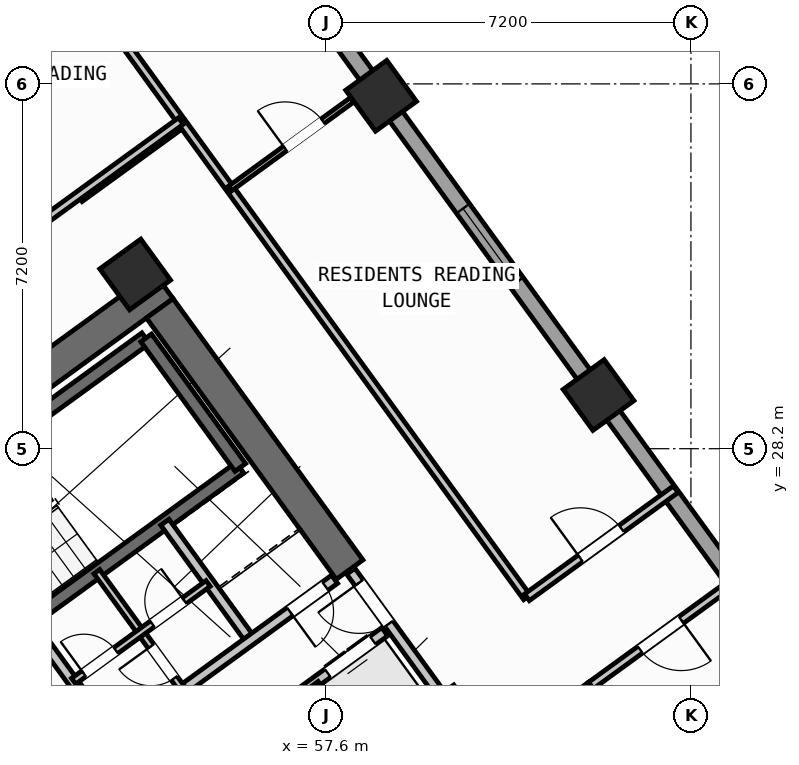
"""IFC4 building model, lengths in metres.
Left out: names, types, materials, properties, quantities, classifications, styles, units other than length and angle.
Written with IfcOpenShell. Run it as: python <this file> out.ifc"""

import sys

from ifc_helpers import new_model, si_unit, direction, frame, frame_2d, origin, origin_2d, place, context, subcontext, project, spatial, rectangle, hollow_rectangle, extrude, source, transform, mapped, element, fill, save


model = new_model("IFC4")
c1 = context("Model", 3, precision=1e-05, world=origin(), true_north=direction((0.0, 1.0)))
c2 = subcontext(c1, "Body", "Model", "MODEL_VIEW")
j1 = project(units=[si_unit("LENGTHUNIT", "METRE"), si_unit("PLANEANGLEUNIT", "RADIAN")], contexts=[c1])
p1 = place(None, origin())
s1 = spatial("IfcSite", under=j1, at=p1, CompositionType="ELEMENT")
p2 = place(p1, origin())
s2 = spatial("IfcBuilding", under=s1, at=p2, CompositionType="ELEMENT")
p3 = place(p2, frame((0.0, 0.0, 81.0)))
s3 = spatial("IfcBuildingStorey", under=s2, at=p3, CompositionType="ELEMENT", Elevation=81.0)
p4 = place(p3, frame((44.325, 24.113, 0.0), z_axis=(0.0, 0.0, 1.0), x_axis=(0.809012664862, 0.58779121131, 0.0)))
e1 = element("IfcWall", 1, at=p4, inside=s3, PredefinedType="SHEAR", context=c2, shape_type="SweptSolid", body=[
    extrude(rectangle(XDim=12.44, YDim=0.65, at=frame_2d((6.22, 0.0))), origin(), (0.0, 0.0, 1.0), 3.32),
])
p5 = place(p3, frame((58.064, 25.813, 0.0), z_axis=(0.0, 0.0, 1.0), x_axis=(-0.58777996584, 0.809020835181, 0.0)))
e2 = element("IfcWall", 2, at=p5, inside=s3, PredefinedType="SHEAR", context=c2, shape_type="SweptSolid", body=[
    extrude(rectangle(XDim=6.375, YDim=0.65, at=frame_2d((3.188, 0.0))), origin(), (0.0, 0.0, 1.0), 3.32),
])
m1 = source(origin(), c2, "Body", "SweptSolid", [
    extrude(hollow_rectangle(XDim=1.0, YDim=1.0, WallThickness=0.04, at=origin_2d()), origin(), (0.0, 0.0, 1.0), 3.6),
])
for number, where, z_axis, x_axis in (
    (3, (53.832, 31.638, 0.0), (0.0, 0.0, 1.0), (0.809, 0.588, 0.0)),
    (4, (62.977, 29.259, 0.0), (0.0, 0.0, 1.0), (0.809, 0.588, 0.0)),
    (5, (58.686, 35.165, 0.0), (0.0, 0.0, 1.0), (0.809, 0.588, 0.0)),
):
    element("IfcColumn", number, at=place(p3, frame(where, z_axis=z_axis, x_axis=x_axis)), inside=s3, PredefinedType="COLUMN", context=c2, shape_type="MappedRepresentation", body=[
        mapped(m1, transform((0.0, 0.0, 0.0), scale=1.0)),
    ])
p6 = place(p3, frame((42.207, 31.597, 0.0), z_axis=(0.0, 0.0, 1.0), x_axis=(0.809020333377, 0.587780656523, 0.0)))
e6 = element("IfcWall", 6, at=p6, inside=s3, PredefinedType="STANDARD", context=c2, shape_type="SweptSolid", body=[
    extrude(rectangle(XDim=15.223, YDim=0.32, at=frame_2d((7.611, 0.0))), origin(), (0.0, 0.0, 1.0), 3.32),
])
p7 = place(p6, frame((12.82, 0.0, 0.0)))
e7 = element("IfcOpeningElement", 7, at=p7, cuts=e6, PredefinedType="OPENING", context=c2, shape_type="SweptSolid", body=[
    extrude(rectangle(XDim=1.05, YDim=2.15, at=frame_2d((0.525, 1.075))), frame((0.0, 0.17, 0.0), z_axis=(0.0, -1.0, 0.0), x_axis=(1.0, 0.0, 0.0)), (0.0, 0.0, 1.0), 0.34),
])
p8 = place(p6, frame((0.775, 0.0, 0.85)))
e8 = element("IfcOpeningElement", 8, at=p8, cuts=e6, PredefinedType="OPENING", context=c2, shape_type="SweptSolid", body=[
    extrude(rectangle(XDim=1.8, YDim=1.5, at=frame_2d((0.9, 0.75))), frame((0.0, 0.17, 0.0), z_axis=(0.0, -1.0, 0.0), x_axis=(1.0, 0.0, 0.0)), (0.0, 0.0, 1.0), 0.34),
])
p9 = place(p6, frame((5.544, 0.0, 0.85)))
e9 = element("IfcOpeningElement", 9, at=p9, cuts=e6, PredefinedType="OPENING", context=c2, shape_type="SweptSolid", body=[
    extrude(rectangle(XDim=1.8, YDim=1.5, at=frame_2d((0.9, 0.75))), frame((0.0, 0.17, 0.0), z_axis=(0.0, -1.0, 0.0), x_axis=(1.0, 0.0, 0.0)), (0.0, 0.0, 1.0), 0.34),
])
p10 = place(p6, frame((10.219, 0.0, 1.0)))
e10 = element("IfcOpeningElement", 10, at=p10, cuts=e6, PredefinedType="OPENING", context=c2, shape_type="SweptSolid", body=[
    extrude(rectangle(XDim=0.9, YDim=1.25, at=frame_2d((0.45, 0.625))), frame((0.0, 0.17, 0.0), z_axis=(0.0, -1.0, 0.0), x_axis=(1.0, 0.0, 0.0)), (0.0, 0.0, 1.0), 0.34),
])
p11 = place(p3, frame((54.81, 40.5, 0.0), z_axis=(0.0, 0.0, 1.0), x_axis=(0.587783625747, -0.809018176127, 0.0)))
e11 = element("IfcWall", 11, at=p11, inside=s3, PredefinedType="STANDARD", context=c2, shape_type="SweptSolid", body=[
    extrude(rectangle(XDim=21.587, YDim=0.32, at=frame_2d((10.794, 0.0))), origin(), (0.0, 0.0, 1.0), 2.745),
])
p12 = place(p11, frame((2.356, 0.0, 0.8)))
e12 = element("IfcOpeningElement", 12, at=p12, cuts=e11, PredefinedType="OPENING", context=c2, shape_type="SweptSolid", body=[
    extrude(rectangle(XDim=2.1, YDim=1.55, at=frame_2d((1.05, 0.775))), frame((0.0, 0.17, 0.0), z_axis=(0.0, -1.0, 0.0), x_axis=(1.0, 0.0, 0.0)), (0.0, 0.0, 1.0), 0.34),
])
p13 = place(p11, frame((9.344, 0.0, 0.85)))
e13 = element("IfcOpeningElement", 13, at=p13, cuts=e11, PredefinedType="OPENING", context=c2, shape_type="SweptSolid", body=[
    extrude(rectangle(XDim=1.8, YDim=1.5, at=frame_2d((0.9, 0.75))), frame((0.0, 0.17, 0.0), z_axis=(0.0, -1.0, 0.0), x_axis=(1.0, 0.0, 0.0)), (0.0, 0.0, 1.0), 0.34),
])
p14 = place(p11, frame((19.209, 0.0, 1.0)))
e14 = element("IfcOpeningElement", 14, at=p14, cuts=e11, PredefinedType="OPENING", context=c2, shape_type="SweptSolid", body=[
    extrude(rectangle(XDim=0.9, YDim=1.25, at=frame_2d((0.45, 0.625))), frame((0.0, 0.17, 0.0), z_axis=(0.0, -1.0, 0.0), x_axis=(1.0, 0.0, 0.0)), (0.0, 0.0, 1.0), 0.34),
])
p15 = place(p3, frame((48.006, 25.996, 0.0), z_axis=(0.0, 0.0, 1.0), x_axis=(0.80901903764, 0.587782439969, 0.0)))
e15 = element("IfcWall", 15, at=p15, inside=s3, PredefinedType="SHEAR", context=c2, shape_type="SweptSolid", body=[
    extrude(rectangle(XDim=7.46, YDim=0.26, at=frame_2d((3.73, 0.0))), origin(), (0.0, 0.0, 1.0), 3.32),
])
p16 = place(p3, frame((49.863, 23.44, 0.0), z_axis=(0.0, 0.0, 1.0), x_axis=(0.809003474932, 0.587803859759, 0.0)))
e16 = element("IfcWall", 16, at=p16, inside=s3, PredefinedType="SHEAR", context=c2, shape_type="SweptSolid", body=[
    extrude(rectangle(XDim=7.46, YDim=0.26, at=frame_2d((3.73, 0.0))), origin(), (0.0, 0.0, 1.0), 3.32),
])
p17 = place(p16, frame((0.36, 0.0, 0.0)))
e17 = element("IfcOpeningElement", 17, at=p17, cuts=e16, PredefinedType="OPENING", context=c2, shape_type="SweptSolid", body=[
    extrude(rectangle(XDim=0.86, YDim=2.05, at=frame_2d((0.43, 1.025))), frame((0.0, 0.14, 0.0), z_axis=(0.0, -1.0, 0.0), x_axis=(1.0, 0.0, 0.0)), (0.0, 0.0, 1.0), 0.28),
])
p18 = place(p3, frame((55.906, 27.831, 0.0), z_axis=(0.0, 0.0, 1.0), x_axis=(-0.587804123638, 0.809003283204, 0.0)))
e18 = element("IfcWall", 18, at=p18, inside=s3, PredefinedType="SHEAR", context=c2, shape_type="SweptSolid", body=[
    extrude(rectangle(XDim=3.16, YDim=0.26, at=frame_2d((1.58, 0.0))), origin(), (0.0, 0.0, 1.0), 3.32),
])
p19 = place(p3, frame((54.421, 21.436, 0.0), z_axis=(0.0, 0.0, 1.0), x_axis=(0.809013710463, 0.587789772183, 0.0)))
e19 = element("IfcWall", 19, at=p19, inside=s3, PredefinedType="STANDARD", context=c2, shape_type="SweptSolid", body=[
    extrude(rectangle(XDim=5.36, YDim=0.2, at=frame_2d((2.68, 0.0))), origin(), (0.0, 0.0, 1.0), 3.31),
])
p20 = place(p19, frame((0.37, 0.0, 0.0)))
e20 = element("IfcOpeningElement", 20, at=p20, cuts=e19, PredefinedType="OPENING", context=c2, shape_type="SweptSolid", body=[
    extrude(rectangle(XDim=1.1, YDim=2.15, at=frame_2d((0.55, 1.075))), frame((0.0, 0.11, 0.0), z_axis=(0.0, -1.0, 0.0), x_axis=(1.0, 0.0, 0.0)), (0.0, 0.0, 1.0), 0.22),
])
p21 = place(p19, frame((2.17, 0.0, 0.0)))
e21 = element("IfcOpeningElement", 21, at=p21, cuts=e19, PredefinedType="OPENING", context=c2, shape_type="SweptSolid", body=[
    extrude(rectangle(XDim=1.1, YDim=2.15, at=frame_2d((0.55, 1.075))), frame((0.0, 0.11, 0.0), z_axis=(0.0, -1.0, 0.0), x_axis=(1.0, 0.0, 0.0)), (0.0, 0.0, 1.0), 0.22),
])
p22 = place(p19, frame((3.97, 0.0, 0.0)))
e22 = element("IfcOpeningElement", 22, at=p22, cuts=e19, PredefinedType="OPENING", context=c2, shape_type="SweptSolid", body=[
    extrude(rectangle(XDim=1.1, YDim=2.15, at=frame_2d((0.55, 1.075))), frame((0.0, 0.11, 0.0), z_axis=(0.0, -1.0, 0.0), x_axis=(1.0, 0.0, 0.0)), (0.0, 0.0, 1.0), 0.22),
])
p23 = place(p3, frame((58.29, 22.27, 0.0), z_axis=(0.0, 0.0, 1.0), x_axis=(-0.587840865826, 0.808976585857, 0.0)))
e23 = element("IfcWall", 23, at=p23, inside=s3, PredefinedType="STANDARD", context=c2, shape_type="SweptSolid", body=[
    extrude(rectangle(XDim=1.58, YDim=0.2, at=frame_2d((0.79, 0.0))), origin(), (0.0, 0.0, 1.0), 3.31),
])
p24 = place(p3, frame((53.425, 22.468, 0.0), z_axis=(0.0, 0.0, 1.0), x_axis=(-0.5877230039, 0.809062216821, 0.0)))
e24 = element("IfcWall", 24, at=p24, inside=s3, PredefinedType="STANDARD", context=c2, shape_type="SweptSolid", body=[
    extrude(rectangle(XDim=2.88, YDim=0.2, at=frame_2d((1.44, 0.0))), origin(), (0.0, 0.0, 1.0), 3.31),
])
p25 = place(p3, frame((56.111, 24.419, 0.0), z_axis=(0.0, 0.0, 1.0), x_axis=(-0.58777848983, 0.809021907548, 0.0)))
e25 = element("IfcWall", 25, at=p25, inside=s3, PredefinedType="STANDARD", context=c2, shape_type="SweptSolid", body=[
    extrude(rectangle(XDim=2.88, YDim=0.2, at=frame_2d((1.44, 0.0))), origin(), (0.0, 0.0, 1.0), 3.31),
])
p26 = place(p3, frame((53.425, 22.468, 0.0), z_axis=(0.0, 0.0, 1.0), x_axis=(0.80902705128, 0.587771409902, 0.0)))
e26 = element("IfcWall", 26, at=p26, inside=s3, PredefinedType="STANDARD", context=c2, shape_type="SweptSolid", body=[
    extrude(rectangle(XDim=5.368, YDim=0.2, at=frame_2d((2.684, 0.0))), origin(), (0.0, 0.0, 1.0), 3.31),
])
p27 = place(p26, frame((4.28, 0.0, 0.0)))
e27 = element("IfcOpeningElement", 27, at=p27, cuts=e26, PredefinedType="OPENING", context=c2, shape_type="SweptSolid", body=[
    extrude(rectangle(XDim=0.86, YDim=2.05, at=frame_2d((0.43, 1.025))), frame((0.0, 0.11, 0.0), z_axis=(0.0, -1.0, 0.0), x_axis=(1.0, 0.0, 0.0)), (0.0, 0.0, 1.0), 0.22),
])
p28 = place(p26, frame((0.35, 0.0, 0.0)))
e28 = element("IfcOpeningElement", 28, at=p28, cuts=e26, PredefinedType="OPENING", context=c2, shape_type="SweptSolid", body=[
    extrude(rectangle(XDim=0.86, YDim=2.05, at=frame_2d((0.43, 1.025))), frame((0.0, 0.11, 0.0), z_axis=(0.0, -1.0, 0.0), x_axis=(1.0, 0.0, 0.0)), (0.0, 0.0, 1.0), 0.22),
])
p29 = place(p3, frame((54.768, 23.443, 0.0), z_axis=(0.0, 0.0, 1.0), x_axis=(-0.587736077749, 0.809052719489, 0.0)))
e29 = element("IfcWall", 29, at=p29, inside=s3, PredefinedType="PLUMBINGWALL", context=c2, shape_type="SweptSolid", body=[
    extrude(rectangle(XDim=1.4, YDim=0.14, at=frame_2d((0.7, 0.0))), origin(), (0.0, 0.0, 1.0), 3.31),
])
p30 = place(p29, frame((0.28, 0.0, 0.0)))
e30 = element("IfcOpeningElement", 30, at=p30, cuts=e29, PredefinedType="OPENING", context=c2, shape_type="SweptSolid", body=[
    extrude(rectangle(XDim=0.78, YDim=2.05, at=frame_2d((0.39, 1.025))), frame((0.0, 0.08, 0.0), z_axis=(0.0, -1.0, 0.0), x_axis=(1.0, 0.0, 0.0)), (0.0, 0.0, 1.0), 0.16),
])
p31 = place(p3, frame((53.945, 24.576, 0.0), z_axis=(0.0, 0.0, 1.0), x_axis=(-0.587897037186, 0.808935766095, 0.0)))
e31 = element("IfcWall", 31, at=p31, inside=s3, PredefinedType="PLUMBINGWALL", context=c2, shape_type="SweptSolid", body=[
    extrude(rectangle(XDim=1.48, YDim=0.14, at=frame_2d((0.74, 0.0))), origin(), (0.0, 0.0, 1.0), 3.31),
])
p32 = place(p3, frame((52.618, 23.612, 0.0), z_axis=(0.0, 0.0, 1.0), x_axis=(0.809009587469, 0.587795446889, 0.0)))
e32 = element("IfcWall", 32, at=p32, inside=s3, PredefinedType="PLUMBINGWALL", context=c2, shape_type="SweptSolid", body=[
    extrude(rectangle(XDim=3.28, YDim=0.14, at=frame_2d((1.64, 0.0))), origin(), (0.0, 0.0, 1.0), 3.31),
])
p33 = place(p32, frame((0.25, 0.0, 0.0)))
e33 = element("IfcOpeningElement", 33, at=p33, cuts=e32, PredefinedType="OPENING", context=c2, shape_type="SweptSolid", body=[
    extrude(rectangle(XDim=0.78, YDim=2.05, at=frame_2d((0.39, 1.025))), frame((0.0, 0.08, 0.0), z_axis=(0.0, -1.0, 0.0), x_axis=(1.0, 0.0, 0.0)), (0.0, 0.0, 1.0), 0.16),
])
p34 = place(p32, frame((1.92, 0.0, 0.0)))
e34 = element("IfcOpeningElement", 34, at=p34, cuts=e32, PredefinedType="OPENING", context=c2, shape_type="SweptSolid", body=[
    extrude(rectangle(XDim=0.78, YDim=2.05, at=frame_2d((0.39, 1.025))), frame((0.0, 0.08, 0.0), z_axis=(0.0, -1.0, 0.0), x_axis=(1.0, 0.0, 0.0)), (0.0, 0.0, 1.0), 0.16),
])
p35 = place(p3, frame((59.827, 23.386, 0.0), z_axis=(0.0, 0.0, 1.0), x_axis=(-0.587803840107, 0.809003489211, 0.0)))
e35 = element("IfcWall", 35, at=p35, inside=s3, PredefinedType="STANDARD", context=c2, shape_type="SweptSolid", body=[
    extrude(rectangle(XDim=2.96, YDim=0.2, at=frame_2d((1.48, 0.0))), origin(), (0.0, 0.0, 1.0), 3.31),
])
p36 = place(p35, frame((1.68, 0.0, 0.0)))
e36 = element("IfcOpeningElement", 36, at=p36, cuts=e35, PredefinedType="OPENING", context=c2, shape_type="SweptSolid", body=[
    extrude(rectangle(XDim=1.0, YDim=2.1, at=frame_2d((0.5, 1.05))), frame((0.0, 0.11, 0.0), z_axis=(0.0, -1.0, 0.0), x_axis=(1.0, 0.0, 0.0)), (0.0, 0.0, 1.0), 0.22),
])
p37 = place(p3, frame((61.082, 22.259, 0.0), z_axis=(0.0, 0.0, 1.0), x_axis=(0.809044195715, 0.587747811039, 0.0)))
e37 = element("IfcWall", 37, at=p37, inside=s3, PredefinedType="PARTITIONING", context=c2, shape_type="SweptSolid", body=[
    extrude(rectangle(XDim=2.158, YDim=0.16, at=frame_2d((1.079, 0.0))), origin(), (0.0, 0.0, 1.0), 3.31),
])
p38 = place(p37, frame((0.598, 0.0, 0.0)))
e38 = element("IfcOpeningElement", 38, at=p38, cuts=e37, PredefinedType="OPENING", context=c2, shape_type="SweptSolid", body=[
    extrude(rectangle(XDim=1.0, YDim=2.1, at=frame_2d((0.5, 1.05))), frame((0.0, 0.09, 0.0), z_axis=(0.0, -1.0, 0.0), x_axis=(1.0, 0.0, 0.0)), (0.0, 0.0, 1.0), 0.18),
])
p39 = place(p3, frame((52.739, 33.143, 0.0), z_axis=(0.0, 0.0, 1.0), x_axis=(0.809000999347, 0.58780726693, 0.0)))
e39 = element("IfcWall", 39, at=p39, inside=s3, PredefinedType="PARTITIONING", context=c2, shape_type="SweptSolid", body=[
    extrude(rectangle(XDim=2.51, YDim=0.16, at=frame_2d((1.255, 0.0))), origin(), (0.0, 0.0, 1.0), 3.31),
])
p40 = place(p3, frame((64.709, 20.938, 0.0), z_axis=(0.0, 0.0, 1.0), x_axis=(-0.587772420479, 0.809026317077, 0.0)))
e40 = element("IfcWall", 40, at=p40, inside=s3, PredefinedType="PARTITIONING", context=c2, shape_type="SweptSolid", body=[
    extrude(rectangle(XDim=3.2, YDim=0.16, at=frame_2d((1.6, 0.0))), origin(), (0.0, 0.0, 1.0), 3.31),
])
p41 = place(p3, frame((61.564, 25.266, 0.0), z_axis=(0.0, 0.0, 1.0), x_axis=(-0.587784527444, 0.809017521007, 0.0)))
e41 = element("IfcWall", 41, at=p41, inside=s3, PredefinedType="PARTITIONING", context=c2, shape_type="SweptSolid", body=[
    extrude(rectangle(XDim=16.35, YDim=0.16, at=frame_2d((8.175, 0.0))), origin(), (0.0, 0.0, 1.0), 3.31),
])
p42 = place(p3, frame((62.828, 23.527, 0.0), z_axis=(0.0, 0.0, 1.0), x_axis=(0.809003564202, 0.587803736896, 0.0)))
e42 = element("IfcWall", 42, at=p42, inside=s3, PredefinedType="PARTITIONING", context=c2, shape_type="SweptSolid", body=[
    extrude(rectangle(XDim=3.63, YDim=0.16, at=frame_2d((1.815, 0.0))), origin(), (0.0, 0.0, 1.0), 3.31),
])
p43 = place(p42, frame((1.2, 0.0, 0.0)))
e43 = element("IfcOpeningElement", 43, at=p43, cuts=e42, PredefinedType="OPENING", context=c2, shape_type="SweptSolid", body=[
    extrude(rectangle(XDim=1.0, YDim=2.1, at=frame_2d((0.5, 1.05))), frame((0.0, 0.09, 0.0), z_axis=(0.0, -1.0, 0.0), x_axis=(1.0, 0.0, 0.0)), (0.0, 0.0, 1.0), 0.18),
])
p44 = place(p3, frame((61.564, 25.266, 0.0), z_axis=(0.0, 0.0, 1.0), x_axis=(0.809012309495, 0.587791700422, 0.0)))
e44 = element("IfcWall", 44, at=p44, inside=s3, PredefinedType="PARTITIONING", context=c2, shape_type="SweptSolid", body=[
    extrude(rectangle(XDim=3.63, YDim=0.16, at=frame_2d((1.815, 0.0))), origin(), (0.0, 0.0, 1.0), 3.31),
])
p45 = place(p44, frame((1.305, 0.0, 0.0)))
e45 = element("IfcOpeningElement", 45, at=p45, cuts=e44, PredefinedType="OPENING", context=c2, shape_type="SweptSolid", body=[
    extrude(rectangle(XDim=1.0, YDim=2.1, at=frame_2d((0.5, 1.05))), frame((0.0, 0.09, 0.0), z_axis=(0.0, -1.0, 0.0), x_axis=(1.0, 0.0, 0.0)), (0.0, 0.0, 1.0), 0.18),
])
p46 = place(p3, frame((55.703, 33.334, 0.0), z_axis=(0.0, 0.0, 1.0), x_axis=(0.809065651839, 0.587718275209, 0.0)))
e46 = element("IfcWall", 46, at=p46, inside=s3, PredefinedType="PARTITIONING", context=c2, shape_type="SweptSolid", body=[
    extrude(rectangle(XDim=2.978, YDim=0.11, at=frame_2d((1.489, 0.0))), origin(), (0.0, 0.0, 1.0), 2.745),
])
p47 = place(p46, frame((1.345, 0.0, 0.0)))
e47 = element("IfcOpeningElement", 47, at=p47, cuts=e46, PredefinedType="OPENING", context=c2, shape_type="SweptSolid", body=[
    extrude(rectangle(XDim=0.92, YDim=2.08, at=frame_2d((0.46, 1.04))), frame((0.0, 0.065, 0.0), z_axis=(0.0, -1.0, 0.0), x_axis=(1.0, 0.0, 0.0)), (0.0, 0.0, 1.0), 0.13),
])
p48 = place(p3, frame((42.866, 26.044, 0.0), z_axis=(0.0, 0.0, 1.0), x_axis=(0.809020254154, 0.587780765566, 0.0)))
e48 = element("IfcWall", 48, at=p48, inside=s3, PredefinedType="PARTITIONING", context=c2, shape_type="SweptSolid", body=[
    extrude(rectangle(XDim=14.67, YDim=0.16, at=frame_2d((7.335, 0.0))), origin(), (0.0, 0.0, 1.0), 3.31),
])
p49 = place(p48, frame((3.215, 0.0, 0.0)))
e49 = element("IfcOpeningElement", 49, at=p49, cuts=e48, PredefinedType="OPENING", context=c2, shape_type="SweptSolid", body=[
    extrude(rectangle(XDim=1.0, YDim=2.1, at=frame_2d((0.5, 1.05))), frame((0.0, 0.09, 0.0), z_axis=(0.0, -1.0, 0.0), x_axis=(1.0, 0.0, 0.0)), (0.0, 0.0, 1.0), 0.18),
])
p50 = place(p48, frame((9.915, 0.0, 0.0)))
e50 = element("IfcOpeningElement", 50, at=p50, cuts=e48, PredefinedType="OPENING", context=c2, shape_type="SweptSolid", body=[
    extrude(rectangle(XDim=1.0, YDim=2.1, at=frame_2d((0.5, 1.05))), frame((0.0, 0.09, 0.0), z_axis=(0.0, -1.0, 0.0), x_axis=(1.0, 0.0, 0.0)), (0.0, 0.0, 1.0), 0.18),
])
m2 = source(origin(), c2, "Body", "SweptSolid", [
    extrude(rectangle(XDim=1.8, YDim=1.5, at=frame_2d((0.9, 0.75))), frame((0.0, 0.03, 0.0), z_axis=(0.0, -1.0, 0.0), x_axis=(1.0, 0.0, 0.0)), (0.0, 0.0, 1.0), 0.06),
])
p51 = place(p13, origin())
e51 = element("IfcWindow", 51, at=p51, inside=s3, PartitioningType="SINGLE_PANEL", PredefinedType="WINDOW", context=c2, shape_type="MappedRepresentation", body=[
    mapped(m2, transform((0.0, 0.0, 0.0), scale=1.0)),
])
fill(e13, e51)
m3 = source(origin(), c2, "Body", "SweptSolid", [
    extrude(rectangle(XDim=1.1, YDim=2.15, at=frame_2d((0.55, 1.075))), frame((0.0, 0.025, 0.0), z_axis=(0.0, -1.0, 0.0), x_axis=(1.0, 0.0, 0.0)), (0.0, 0.0, 1.0), 0.05),
])
p52 = place(p22, origin())
e52 = element("IfcDoor", 52, at=p52, inside=s3, OperationType="DOUBLE_DOOR_SLIDING", PredefinedType="DOOR", context=c2, shape_type="MappedRepresentation", body=[
    mapped(m3, transform((0.0, 0.0, 0.0), scale=1.0)),
])
fill(e22, e52)
m4 = source(origin(), c2, "Body", "SweptSolid", [
    extrude(rectangle(XDim=0.86, YDim=2.05, at=frame_2d((0.43, 1.025))), frame((0.0, 0.025, 0.0), z_axis=(0.0, -1.0, 0.0), x_axis=(1.0, 0.0, 0.0)), (0.0, 0.0, 1.0), 0.05),
])
p53 = place(p27, frame((0.86, 0.0, 0.0), z_axis=(0.0, 0.0, 1.0), x_axis=(-1.0, 0.0, 0.0)))
e53 = element("IfcDoor", 53, at=p53, inside=s3, OperationType="SINGLE_SWING_RIGHT", PredefinedType="DOOR", context=c2, shape_type="MappedRepresentation", body=[
    mapped(m4, transform((0.0, 0.0, 0.0), scale=1.0)),
])
fill(e27, e53)
m5 = source(origin(), c2, "Body", "SweptSolid", [
    extrude(rectangle(XDim=0.78, YDim=2.05, at=frame_2d((0.39, 1.025))), frame((0.0, 0.025, 0.0), z_axis=(0.0, -1.0, 0.0), x_axis=(1.0, 0.0, 0.0)), (0.0, 0.0, 1.0), 0.05),
])
p54 = place(p30, origin())
e54 = element("IfcDoor", 54, at=p54, inside=s3, OperationType="SINGLE_SWING_RIGHT", PredefinedType="DOOR", context=c2, shape_type="MappedRepresentation", body=[
    mapped(m5, transform((0.0, 0.0, 0.0), scale=1.0)),
])
fill(e30, e54)
p55 = place(p33, origin())
e55 = element("IfcDoor", 55, at=p55, inside=s3, OperationType="SINGLE_SWING_LEFT", PredefinedType="DOOR", context=c2, shape_type="MappedRepresentation", body=[
    mapped(m5, transform((0.0, 0.0, 0.0), scale=1.0)),
])
fill(e33, e55)
p56 = place(p34, origin())
e56 = element("IfcDoor", 56, at=p56, inside=s3, OperationType="SINGLE_SWING_RIGHT", PredefinedType="DOOR", context=c2, shape_type="MappedRepresentation", body=[
    mapped(m5, transform((0.0, 0.0, 0.0), scale=1.0)),
])
fill(e34, e56)
m6 = source(origin(), c2, "Body", "SweptSolid", [
    extrude(rectangle(XDim=1.0, YDim=2.1, at=frame_2d((0.5, 1.05))), frame((0.0, 0.025, 0.0), z_axis=(0.0, -1.0, 0.0), x_axis=(1.0, 0.0, 0.0)), (0.0, 0.0, 1.0), 0.05),
])
p57 = place(p36, origin())
e57 = element("IfcDoor", 57, at=p57, inside=s3, OperationType="SINGLE_SWING_RIGHT", PredefinedType="DOOR", context=c2, shape_type="MappedRepresentation", body=[
    mapped(m6, transform((0.0, 0.0, 0.0), scale=1.0)),
])
fill(e36, e57)
p58 = place(p45, origin())
e58 = element("IfcDoor", 58, at=p58, inside=s3, OperationType="SINGLE_SWING_LEFT", PredefinedType="DOOR", context=c2, shape_type="MappedRepresentation", body=[
    mapped(m6, transform((0.0, 0.0, 0.0), scale=1.0)),
])
fill(e45, e58)
m7 = source(origin(), c2, "Body", "SweptSolid", [
    extrude(rectangle(XDim=0.92, YDim=2.08, at=frame_2d((0.46, 1.04))), frame((0.0, 0.025, 0.0), z_axis=(0.0, -1.0, 0.0), x_axis=(1.0, 0.0, 0.0)), (0.0, 0.0, 1.0), 0.05),
])
p59 = place(p47, origin())
e59 = element("IfcDoor", 59, at=p59, inside=s3, OperationType="SINGLE_SWING_LEFT", PredefinedType="DOOR", context=c2, shape_type="MappedRepresentation", body=[
    mapped(m7, transform((0.0, 0.0, 0.0), scale=1.0)),
])
fill(e47, e59)
p60 = place(p43, frame((1.0, 0.0, 0.0), z_axis=(0.0, 0.0, 1.0), x_axis=(-1.0, 0.0, 0.0)))
e60 = element("IfcDoor", 60, at=p60, inside=s3, OperationType="SINGLE_SWING_LEFT", PredefinedType="DOOR", context=c2, shape_type="MappedRepresentation", body=[
    mapped(m6, transform((0.0, 0.0, 0.0), scale=1.0)),
])
fill(e43, e60)
save(model, sys.argv[1])
